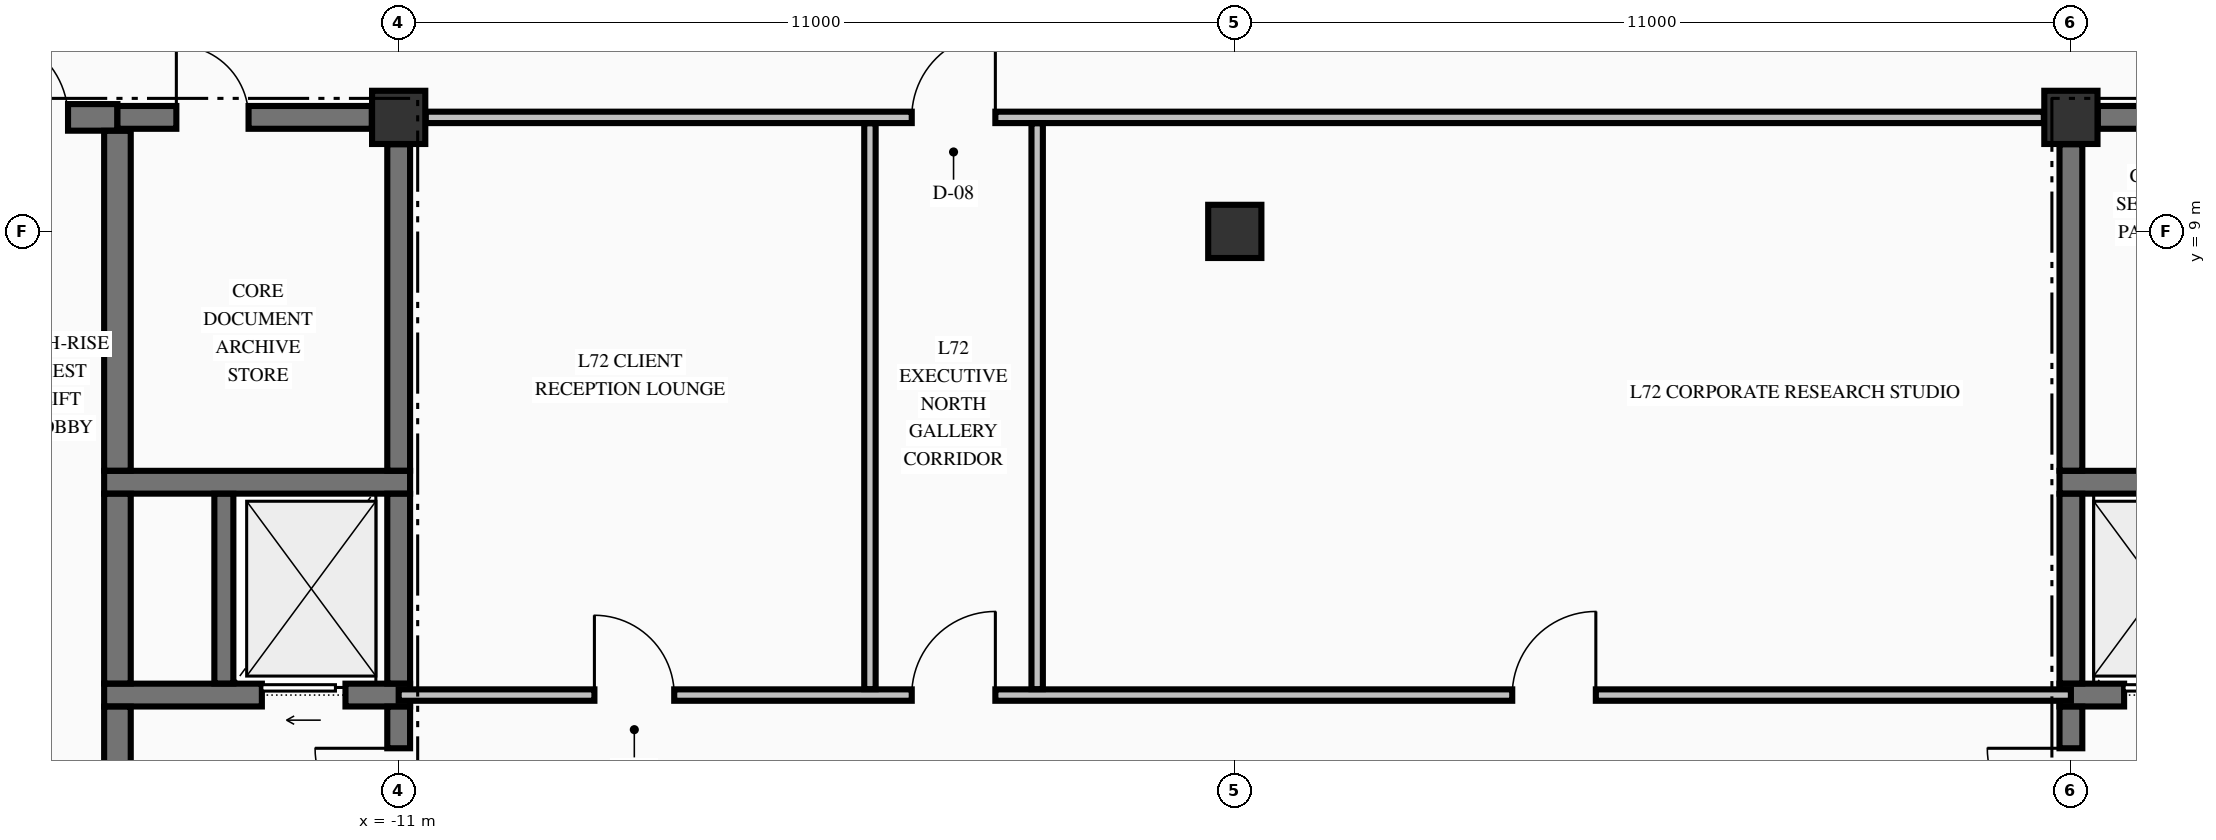
"""IFC4 building model, lengths in metres.
Left out: names, types, materials, properties, quantities, classifications, styles, units other than length and angle.
Written with IfcOpenShell. Run it as: python <this file> out.ifc"""

import sys

from ifc_helpers import new_model, si_unit, direction, frame, frame_2d, origin, origin_2d, place, context, subcontext, project, spatial, rectangle, extrude, element, fill, save


model = new_model("IFC4")
c1 = context("Model", 3, precision=1e-05, world=origin(), true_north=direction((0.0, 1.0)))
c2 = subcontext(c1, "Body", "Model", "MODEL_VIEW")
j1 = project(units=[si_unit("LENGTHUNIT", "METRE"), si_unit("PLANEANGLEUNIT", "RADIAN")], contexts=[c1])
p1 = place(None, origin())
s1 = spatial("IfcSite", under=j1, at=p1, CompositionType="ELEMENT")
p2 = place(p1, origin())
s2 = spatial("IfcBuilding", under=s1, at=p2, CompositionType="ELEMENT")
p3 = place(p2, frame((0.0, 0.0, 270.58)))
s3 = spatial("IfcBuildingStorey", under=s2, at=p3, CompositionType="ELEMENT", Elevation=270.58)
for number, where, z_axis, x_axis in (
    (1, (-11.0, 10.5, -0.325), (0.0, 0.0, 1.0), (1.0, 0.0, 0.0)),
    (2, (11.0, 10.5, -0.325), (0.0, 0.0, 1.0), (1.0, 0.0, 0.0)),
    (3, (0.0, 9.0, -0.325), (0.0, 0.0, 1.0), (1.0, 0.0, 0.0)),
):
    element("IfcColumn", number, at=place(p3, frame(where, z_axis=z_axis, x_axis=x_axis)), inside=s3, PredefinedType="COLUMN", context=c2, shape_type="SweptSolid", body=[
        extrude(rectangle(XDim=0.7, YDim=0.7, at=origin_2d()), origin(), (0.0, 0.0, 1.0), 3.815),
    ])
p4 = place(p3, frame((-14.875, 2.9, 0.0), z_axis=(0.0, 0.0, 1.0), x_axis=(1.0, 0.0, 0.0)))
e4 = element("IfcWall", 4, at=p4, inside=s3, PredefinedType="SHEAR", context=c2, shape_type="SweptSolid", body=[
    extrude(rectangle(XDim=4.025, YDim=0.3, at=frame_2d((2.012, 0.0))), origin(), (0.0, 0.0, 1.0), 3.49),
])
p5 = place(p4, frame((2.075, 0.0, 0.0)))
e5 = element("IfcOpeningElement", 5, at=p5, cuts=e4, PredefinedType="OPENING", context=c2, shape_type="SweptSolid", body=[
    extrude(rectangle(XDim=1.1, YDim=2.2, at=frame_2d((0.55, 1.1))), frame((0.0, 0.16, 0.0), z_axis=(0.0, -1.0, 0.0), x_axis=(1.0, 0.0, 0.0)), (0.0, 0.0, 1.0), 0.32),
])
p6 = place(p3, frame((10.85, 2.9, 0.0), z_axis=(0.0, 0.0, 1.0), x_axis=(1.0, 0.0, 0.0)))
e6 = element("IfcWall", 6, at=p6, inside=s3, PredefinedType="SHEAR", context=c2, shape_type="SweptSolid", body=[
    extrude(rectangle(XDim=4.025, YDim=0.3, at=frame_2d((2.012, 0.0))), origin(), (0.0, 0.0, 1.0), 3.49),
])
p7 = place(p6, frame((0.85, 0.0, 0.0)))
e7 = element("IfcOpeningElement", 7, at=p7, cuts=e6, PredefinedType="OPENING", context=c2, shape_type="SweptSolid", body=[
    extrude(rectangle(XDim=1.1, YDim=2.2, at=frame_2d((0.55, 1.1))), frame((0.0, 0.16, 0.0), z_axis=(0.0, -1.0, 0.0), x_axis=(1.0, 0.0, 0.0)), (0.0, 0.0, 1.0), 0.32),
])
for number, where, z_axis, x_axis in (
    (8, (-14.875, 5.7, 0.0), (0.0, 0.0, 1.0), (1.0, 0.0, 0.0)),
    (9, (10.85, 5.7, 0.0), (0.0, 0.0, 1.0), (1.0, 0.0, 0.0)),
):
    element("IfcWall", number, at=place(p3, frame(where, z_axis=z_axis, x_axis=x_axis)), inside=s3, PredefinedType="SHEAR", context=c2, shape_type="SweptSolid", body=[
        extrude(rectangle(XDim=4.025, YDim=0.3, at=frame_2d((2.012, 0.0))), origin(), (0.0, 0.0, 1.0), 3.49),
    ])
p8 = place(p3, frame((-19.646, 10.5, 0.0), z_axis=(0.0, 0.0, 1.0), x_axis=(1.0, 0.0, 0.0)))
e10 = element("IfcWall", 10, at=p8, inside=s3, PredefinedType="SHEAR", context=c2, shape_type="SweptSolid", body=[
    extrude(rectangle(XDim=4.946, YDim=0.35, at=frame_2d((2.473, 0.0))), origin(), (0.0, 0.0, 1.0), 3.49),
])
p9 = place(p8, frame((3.196, 0.0, 0.0)))
e11 = element("IfcOpeningElement", 11, at=p9, cuts=e10, PredefinedType="OPENING", context=c2, shape_type="SweptSolid", body=[
    extrude(rectangle(XDim=1.1, YDim=2.15, at=frame_2d((0.55, 1.075))), frame((0.0, 0.185, 0.0), z_axis=(0.0, -1.0, 0.0), x_axis=(1.0, 0.0, 0.0)), (0.0, 0.0, 1.0), 0.37),
])
p10 = place(p3, frame((-14.7, 10.5, 0.0), z_axis=(0.0, 0.0, 1.0), x_axis=(1.0, 0.0, 0.0)))
e12 = element("IfcWall", 12, at=p10, inside=s3, PredefinedType="SHEAR", context=c2, shape_type="SweptSolid", body=[
    extrude(rectangle(XDim=3.346, YDim=0.3, at=frame_2d((1.673, 0.0))), origin(), (0.0, 0.0, 1.0), 3.49),
])
p11 = place(p10, frame((0.775, 0.0, 0.0)))
e13 = element("IfcOpeningElement", 13, at=p11, cuts=e12, PredefinedType="OPENING", context=c2, shape_type="SweptSolid", body=[
    extrude(rectangle(XDim=0.95, YDim=2.15, at=frame_2d((0.475, 1.075))), frame((0.0, 0.16, 0.0), z_axis=(0.0, -1.0, 0.0), x_axis=(1.0, 0.0, 0.0)), (0.0, 0.0, 1.0), 0.32),
])
p12 = place(p3, frame((11.354, 10.5, 0.0), z_axis=(0.0, 0.0, 1.0), x_axis=(1.0, 0.0, 0.0)))
e14 = element("IfcWall", 14, at=p12, inside=s3, PredefinedType="SHEAR", context=c2, shape_type="SweptSolid", body=[
    extrude(rectangle(XDim=3.346, YDim=0.3, at=frame_2d((1.673, 0.0))), origin(), (0.0, 0.0, 1.0), 3.49),
])
p13 = place(p12, frame((2.151, 0.0, 0.0)))
e15 = element("IfcOpeningElement", 15, at=p13, cuts=e14, PredefinedType="OPENING", context=c2, shape_type="SweptSolid", body=[
    extrude(rectangle(XDim=0.95, YDim=2.15, at=frame_2d((0.475, 1.075))), frame((0.0, 0.16, 0.0), z_axis=(0.0, -1.0, 0.0), x_axis=(1.0, 0.0, 0.0)), (0.0, 0.0, 1.0), 0.32),
])
p14 = place(p3, frame((-11.0, 2.9, 0.0), z_axis=(0.0, 0.0, 1.0), x_axis=(1.0, 0.0, 0.0)))
e16 = element("IfcWall", 16, at=p14, inside=s3, PredefinedType="PARTITIONING", context=c2, shape_type="SweptSolid", body=[
    extrude(rectangle(XDim=22.0, YDim=0.15, at=frame_2d((11.0, 0.0))), origin(), (0.0, 0.0, 1.0), 3.49),
])
p15 = place(p14, frame((6.75, 0.0, 0.0)))
e17 = element("IfcOpeningElement", 17, at=p15, cuts=e16, PredefinedType="OPENING", context=c2, shape_type="SweptSolid", body=[
    extrude(rectangle(XDim=1.1, YDim=2.15, at=frame_2d((0.55, 1.075))), frame((0.0, 0.085, 0.0), z_axis=(0.0, -1.0, 0.0), x_axis=(1.0, 0.0, 0.0)), (0.0, 0.0, 1.0), 0.17),
])
p16 = place(p14, frame((2.575, 0.0, 0.0)))
e18 = element("IfcOpeningElement", 18, at=p16, cuts=e16, PredefinedType="OPENING", context=c2, shape_type="SweptSolid", body=[
    extrude(rectangle(XDim=1.05, YDim=2.15, at=frame_2d((0.525, 1.075))), frame((0.0, 0.085, 0.0), z_axis=(0.0, -1.0, 0.0), x_axis=(1.0, 0.0, 0.0)), (0.0, 0.0, 1.0), 0.17),
])
p17 = place(p14, frame((14.65, 0.0, 0.0)))
e19 = element("IfcOpeningElement", 19, at=p17, cuts=e16, PredefinedType="OPENING", context=c2, shape_type="SweptSolid", body=[
    extrude(rectangle(XDim=1.1, YDim=2.15, at=frame_2d((0.55, 1.075))), frame((0.0, 0.085, 0.0), z_axis=(0.0, -1.0, 0.0), x_axis=(1.0, 0.0, 0.0)), (0.0, 0.0, 1.0), 0.17),
])
p18 = place(p3, frame((-10.644, 10.5, 0.0), z_axis=(0.0, 0.0, 1.0), x_axis=(1.0, 0.0, 0.0)))
e20 = element("IfcWall", 20, at=p18, inside=s3, PredefinedType="PARTITIONING", context=c2, shape_type="SweptSolid", body=[
    extrude(rectangle(XDim=21.288, YDim=0.15, at=frame_2d((10.644, 0.0))), origin(), (0.0, 0.0, 1.0), 3.49),
])
p19 = place(p18, frame((6.394, 0.0, 0.0)))
e21 = element("IfcOpeningElement", 21, at=p19, cuts=e20, PredefinedType="OPENING", context=c2, shape_type="SweptSolid", body=[
    extrude(rectangle(XDim=1.1, YDim=2.15, at=frame_2d((0.55, 1.075))), frame((0.0, 0.085, 0.0), z_axis=(0.0, -1.0, 0.0), x_axis=(1.0, 0.0, 0.0)), (0.0, 0.0, 1.0), 0.17),
])
p20 = place(p3, frame((-14.7, -0.098, 0.0), z_axis=(0.0, 0.0, 1.0), x_axis=(0.0, 1.0, 0.0)))
e22 = element("IfcWall", 22, at=p20, inside=s3, PredefinedType="SHEAR", context=c2, shape_type="SweptSolid", body=[
    extrude(rectangle(XDim=2.846, YDim=0.35, at=frame_2d((1.423, 0.0))), origin(), (0.0, 0.0, 1.0), 3.49),
])
p21 = place(p3, frame((-14.7, 3.052, 0.0), z_axis=(0.0, 0.0, 1.0), x_axis=(0.0, 1.0, 0.0)))
e23 = element("IfcWall", 23, at=p21, inside=s3, PredefinedType="SHEAR", context=c2, shape_type="SweptSolid", body=[
    extrude(rectangle(XDim=2.496, YDim=0.35, at=frame_2d((1.248, 0.0))), origin(), (0.0, 0.0, 1.0), 3.49),
])
p22 = place(p3, frame((-14.7, 5.852, 0.0), z_axis=(0.0, 0.0, 1.0), x_axis=(0.0, 1.0, 0.0)))
e24 = element("IfcWall", 24, at=p22, inside=s3, PredefinedType="SHEAR", context=c2, shape_type="SweptSolid", body=[
    extrude(rectangle(XDim=4.471, YDim=0.35, at=frame_2d((2.235, 0.0))), origin(), (0.0, 0.0, 1.0), 3.49),
])
p23 = place(p3, frame((-13.3, 3.052, 0.0), z_axis=(0.0, 0.0, 1.0), x_axis=(0.0, 1.0, 0.0)))
e25 = element("IfcWall", 25, at=p23, inside=s3, PredefinedType="SOLIDWALL", context=c2, shape_type="SweptSolid", body=[
    extrude(rectangle(XDim=2.496, YDim=0.25, at=frame_2d((1.248, 0.0))), origin(), (0.0, 0.0, 1.0), 3.49),
])
p24 = place(p3, frame((-11.0, 0.354, 0.0), z_axis=(0.0, 0.0, 1.0), x_axis=(0.0, 1.0, 0.0)))
e26 = element("IfcWall", 26, at=p24, inside=s3, PredefinedType="SHEAR", context=c2, shape_type="SweptSolid", body=[
    extrude(rectangle(XDim=2.394, YDim=0.3, at=frame_2d((1.197, 0.0))), origin(), (0.0, 0.0, 1.0), 3.49),
])
p25 = place(p24, frame((0.746, 0.0, 0.0)))
e27 = element("IfcOpeningElement", 27, at=p25, cuts=e26, PredefinedType="OPENING", context=c2, shape_type="SweptSolid", body=[
    extrude(rectangle(XDim=1.1, YDim=2.15, at=frame_2d((0.55, 1.075))), frame((0.0, 0.16, 0.0), z_axis=(0.0, -1.0, 0.0), x_axis=(1.0, 0.0, 0.0)), (0.0, 0.0, 1.0), 0.32),
])
p26 = place(p3, frame((-11.0, 3.052, 0.0), z_axis=(0.0, 0.0, 1.0), x_axis=(0.0, 1.0, 0.0)))
e28 = element("IfcWall", 28, at=p26, inside=s3, PredefinedType="SHEAR", context=c2, shape_type="SweptSolid", body=[
    extrude(rectangle(XDim=2.496, YDim=0.3, at=frame_2d((1.248, 0.0))), origin(), (0.0, 0.0, 1.0), 3.49),
])
p27 = place(p3, frame((-11.0, 5.852, 0.0), z_axis=(0.0, 0.0, 1.0), x_axis=(0.0, 1.0, 0.0)))
e29 = element("IfcWall", 29, at=p27, inside=s3, PredefinedType="SHEAR", context=c2, shape_type="SweptSolid", body=[
    extrude(rectangle(XDim=4.294, YDim=0.3, at=frame_2d((2.147, 0.0))), origin(), (0.0, 0.0, 1.0), 3.49),
])
p28 = place(p3, frame((11.0, 0.354, 0.0), z_axis=(0.0, 0.0, 1.0), x_axis=(0.0, 1.0, 0.0)))
e30 = element("IfcWall", 30, at=p28, inside=s3, PredefinedType="SHEAR", context=c2, shape_type="SweptSolid", body=[
    extrude(rectangle(XDim=2.394, YDim=0.3, at=frame_2d((1.197, 0.0))), origin(), (0.0, 0.0, 1.0), 3.49),
])
p29 = place(p28, frame((0.746, 0.0, 0.0)))
e31 = element("IfcOpeningElement", 31, at=p29, cuts=e30, PredefinedType="OPENING", context=c2, shape_type="SweptSolid", body=[
    extrude(rectangle(XDim=1.1, YDim=2.15, at=frame_2d((0.55, 1.075))), frame((0.0, 0.16, 0.0), z_axis=(0.0, -1.0, 0.0), x_axis=(1.0, 0.0, 0.0)), (0.0, 0.0, 1.0), 0.32),
])
p30 = place(p3, frame((11.0, 3.052, 0.0), z_axis=(0.0, 0.0, 1.0), x_axis=(0.0, 1.0, 0.0)))
e32 = element("IfcWall", 32, at=p30, inside=s3, PredefinedType="SHEAR", context=c2, shape_type="SweptSolid", body=[
    extrude(rectangle(XDim=2.496, YDim=0.3, at=frame_2d((1.248, 0.0))), origin(), (0.0, 0.0, 1.0), 3.49),
])
p31 = place(p3, frame((11.0, 5.852, 0.0), z_axis=(0.0, 0.0, 1.0), x_axis=(0.0, 1.0, 0.0)))
e33 = element("IfcWall", 33, at=p31, inside=s3, PredefinedType="SHEAR", context=c2, shape_type="SweptSolid", body=[
    extrude(rectangle(XDim=4.294, YDim=0.3, at=frame_2d((2.147, 0.0))), origin(), (0.0, 0.0, 1.0), 3.49),
])
for number, where, z_axis, x_axis in (
    (34, (-4.8, 2.978, 0.0), (0.0, 0.0, 1.0), (0.0, 1.0, 0.0)),
    (35, (-2.6, 2.978, 0.0), (0.0, 0.0, 1.0), (0.0, 1.0, 0.0)),
):
    element("IfcWall", number, at=place(p3, frame(where, z_axis=z_axis, x_axis=x_axis)), inside=s3, PredefinedType="PARTITIONING", context=c2, shape_type="SweptSolid", body=[
        extrude(rectangle(XDim=7.444, YDim=0.15, at=frame_2d((3.722, 0.0))), origin(), (0.0, 0.0, 1.0), 3.49),
    ])
p32 = place(p25, origin())
e36 = element("IfcDoor", 36, at=p32, inside=s3, OperationType="SINGLE_SWING_RIGHT", PredefinedType="DOOR", context=c2, shape_type="SweptSolid", body=[
    extrude(rectangle(XDim=1.1, YDim=2.15, at=frame_2d((0.55, 1.075))), frame((0.0, 0.025, 0.0), z_axis=(0.0, -1.0, 0.0), x_axis=(1.0, 0.0, 0.0)), (0.0, 0.0, 1.0), 0.05),
])
fill(e27, e36)
p33 = place(p5, origin())
e37 = element("IfcDoor", 37, at=p33, inside=s3, OperationType="SLIDING_TO_LEFT", PredefinedType="DOOR", context=c2, shape_type="SweptSolid", body=[
    extrude(rectangle(XDim=1.1, YDim=2.2, at=frame_2d((0.55, 1.1))), frame((0.0, 0.025, 0.0), z_axis=(0.0, -1.0, 0.0), x_axis=(1.0, 0.0, 0.0)), (0.0, 0.0, 1.0), 0.05),
])
fill(e5, e37)
p34 = place(p29, origin())
e38 = element("IfcDoor", 38, at=p34, inside=s3, OperationType="SINGLE_SWING_RIGHT", PredefinedType="DOOR", context=c2, shape_type="SweptSolid", body=[
    extrude(rectangle(XDim=1.1, YDim=2.15, at=frame_2d((0.55, 1.075))), frame((0.0, 0.025, 0.0), z_axis=(0.0, -1.0, 0.0), x_axis=(1.0, 0.0, 0.0)), (0.0, 0.0, 1.0), 0.05),
])
fill(e31, e38)
p35 = place(p7, origin())
e39 = element("IfcDoor", 39, at=p35, inside=s3, OperationType="SLIDING_TO_RIGHT", PredefinedType="DOOR", context=c2, shape_type="SweptSolid", body=[
    extrude(rectangle(XDim=1.1, YDim=2.2, at=frame_2d((0.55, 1.1))), frame((0.0, 0.025, 0.0), z_axis=(0.0, -1.0, 0.0), x_axis=(1.0, 0.0, 0.0)), (0.0, 0.0, 1.0), 0.05),
])
fill(e7, e39)
p36 = place(p11, origin())
e40 = element("IfcDoor", 40, at=p36, inside=s3, OperationType="SINGLE_SWING_LEFT", PredefinedType="DOOR", context=c2, shape_type="SweptSolid", body=[
    extrude(rectangle(XDim=0.95, YDim=2.15, at=frame_2d((0.475, 1.075))), frame((0.0, 0.025, 0.0), z_axis=(0.0, -1.0, 0.0), x_axis=(1.0, 0.0, 0.0)), (0.0, 0.0, 1.0), 0.05),
])
fill(e13, e40)
p37 = place(p9, origin())
e41 = element("IfcDoor", 41, at=p37, inside=s3, OperationType="SINGLE_SWING_LEFT", PredefinedType="DOOR", context=c2, shape_type="SweptSolid", body=[
    extrude(rectangle(XDim=1.1, YDim=2.15, at=frame_2d((0.55, 1.075))), frame((0.0, 0.025, 0.0), z_axis=(0.0, -1.0, 0.0), x_axis=(1.0, 0.0, 0.0)), (0.0, 0.0, 1.0), 0.05),
])
fill(e11, e41)
p38 = place(p19, origin())
e42 = element("IfcDoor", 42, at=p38, inside=s3, OperationType="SINGLE_SWING_RIGHT", PredefinedType="DOOR", context=c2, shape_type="SweptSolid", body=[
    extrude(rectangle(XDim=1.1, YDim=2.15, at=frame_2d((0.55, 1.075))), frame((0.0, 0.025, 0.0), z_axis=(0.0, -1.0, 0.0), x_axis=(1.0, 0.0, 0.0)), (0.0, 0.0, 1.0), 0.05),
])
fill(e21, e42)
p39 = place(p15, origin())
e43 = element("IfcDoor", 43, at=p39, inside=s3, OperationType="SINGLE_SWING_RIGHT", PredefinedType="DOOR", context=c2, shape_type="SweptSolid", body=[
    extrude(rectangle(XDim=1.1, YDim=2.15, at=frame_2d((0.55, 1.075))), frame((0.0, 0.025, 0.0), z_axis=(0.0, -1.0, 0.0), x_axis=(1.0, 0.0, 0.0)), (0.0, 0.0, 1.0), 0.05),
])
fill(e17, e43)
p40 = place(p16, origin())
e44 = element("IfcDoor", 44, at=p40, inside=s3, OperationType="SINGLE_SWING_LEFT", PredefinedType="DOOR", context=c2, shape_type="SweptSolid", body=[
    extrude(rectangle(XDim=1.05, YDim=2.15, at=frame_2d((0.525, 1.075))), frame((0.0, 0.025, 0.0), z_axis=(0.0, -1.0, 0.0), x_axis=(1.0, 0.0, 0.0)), (0.0, 0.0, 1.0), 0.05),
])
fill(e18, e44)
p41 = place(p17, origin())
e45 = element("IfcDoor", 45, at=p41, inside=s3, OperationType="SINGLE_SWING_RIGHT", PredefinedType="DOOR", context=c2, shape_type="SweptSolid", body=[
    extrude(rectangle(XDim=1.1, YDim=2.15, at=frame_2d((0.55, 1.075))), frame((0.0, 0.025, 0.0), z_axis=(0.0, -1.0, 0.0), x_axis=(1.0, 0.0, 0.0)), (0.0, 0.0, 1.0), 0.05),
])
fill(e19, e45)
save(model, sys.argv[1])
